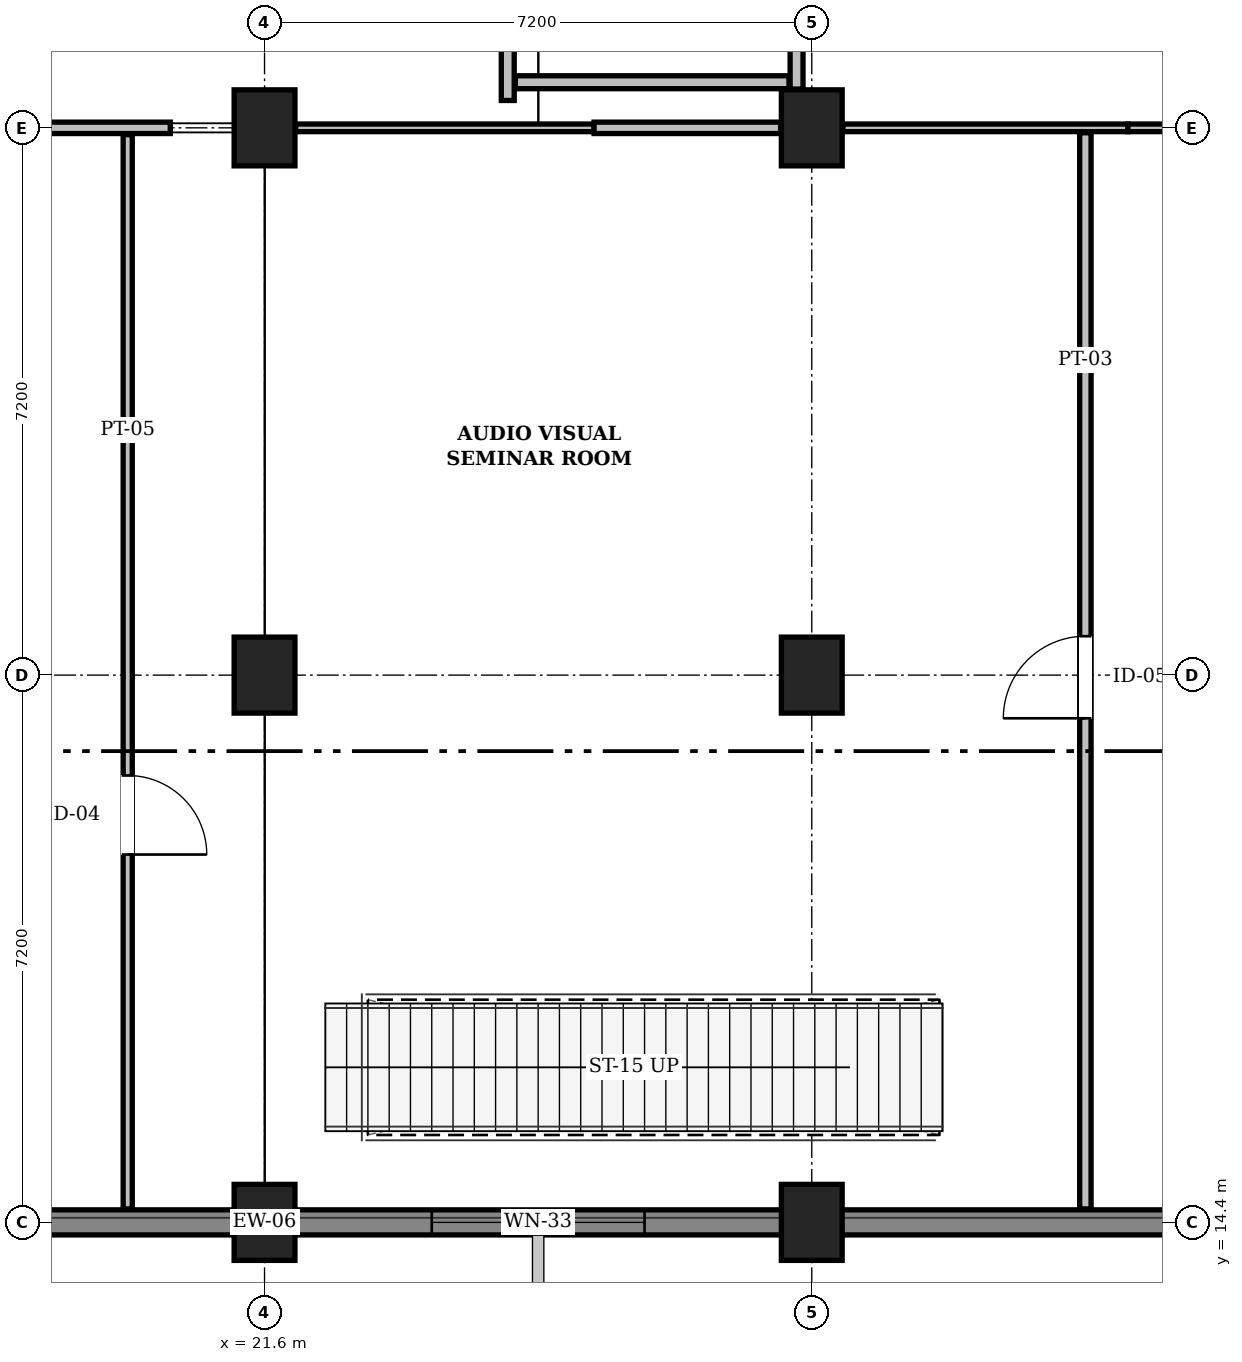
"""IFC4 building model, lengths in metres.
Left out: names, types, materials, properties, quantities, classifications, styles, units other than length and angle.
Written with IfcOpenShell. Run it as: python <this file> out.ifc"""

import sys

from ifc_helpers import new_model, si_unit, direction, frame, frame_2d, origin, origin_2d, place, context, subcontext, project, spatial, rectangle, extrude, element, fill, save


model = new_model("IFC4")
c1 = context("Model", 3, precision=1e-05, world=origin(), true_north=direction((0.0, 1.0)))
c2 = subcontext(c1, "Body", "Model", "MODEL_VIEW")
j1 = project(units=[si_unit("LENGTHUNIT", "METRE"), si_unit("PLANEANGLEUNIT", "RADIAN")], contexts=[c1])
p1 = place(None, origin())
s1 = spatial("IfcSite", under=j1, at=p1, CompositionType="ELEMENT")
p2 = place(p1, origin())
s2 = spatial("IfcBuilding", under=s1, at=p2, CompositionType="ELEMENT")
p3 = place(p2, frame((0.0, 0.0, 4.8)))
s3 = spatial("IfcBuildingStorey", under=s2, at=p3, CompositionType="ELEMENT", Elevation=4.8)
for number, where, z_axis, x_axis in (
    (1, (21.6, 14.4, 0.0), (0.0, 0.0, 1.0), (1.0, 0.0, 0.0)),
    (2, (21.6, 21.6, 0.0), (0.0, 0.0, 1.0), (1.0, 0.0, 0.0)),
    (3, (21.6, 28.8, 0.0), (0.0, 0.0, 1.0), (1.0, 0.0, 0.0)),
    (4, (28.8, 14.4, 0.0), (0.0, 0.0, 1.0), (1.0, 0.0, 0.0)),
    (5, (28.8, 21.6, 0.0), (0.0, 0.0, 1.0), (1.0, 0.0, 0.0)),
    (6, (28.8, 28.8, 0.0), (0.0, 0.0, 1.0), (1.0, 0.0, 0.0)),
):
    element("IfcColumn", number, at=place(p3, frame(where, z_axis=z_axis, x_axis=x_axis)), inside=s3, PredefinedType="COLUMN", context=c2, shape_type="SweptSolid", body=[
        extrude(rectangle(XDim=0.8, YDim=1.0, at=origin_2d()), origin(), (0.0, 0.0, 1.0), 4.8),
    ])
p4 = place(p3, frame((36.0, 14.4, 0.0), z_axis=(0.0, 0.0, 1.0), x_axis=(-1.0, 0.0, 0.0)))
e7 = element("IfcWall", 7, at=p4, inside=s3, PredefinedType="SOLIDWALL", context=c2, shape_type="SweptSolid", body=[
    extrude(rectangle(XDim=7.2, YDim=0.33, at=frame_2d((3.6, 0.0))), origin(), (0.0, 0.0, 1.0), 4.52),
])
p5 = place(p3, frame((28.8, 14.4, 0.0), z_axis=(0.0, 0.0, 1.0), x_axis=(-1.0, 0.0, 0.0)))
e8 = element("IfcWall", 8, at=p5, inside=s3, PredefinedType="SOLIDWALL", context=c2, shape_type="SweptSolid", body=[
    extrude(rectangle(XDim=7.2, YDim=0.33, at=frame_2d((3.6, 0.0))), origin(), (0.0, 0.0, 1.0), 4.52),
])
p6 = place(p5, frame((2.2, 0.0, 0.95)))
e9 = element("IfcOpeningElement", 9, at=p6, cuts=e8, PredefinedType="OPENING", context=c2, shape_type="SweptSolid", body=[
    extrude(rectangle(XDim=2.8, YDim=1.8, at=frame_2d((1.4, 0.9))), frame((0.0, 0.177, 0.0), z_axis=(0.0, -1.0, 0.0), x_axis=(1.0, 0.0, 0.0)), (0.0, 0.0, 1.0), 0.354),
])
p7 = place(p3, frame((21.6, 14.4, 0.0), z_axis=(0.0, 0.0, 1.0), x_axis=(-1.0, 0.0, 0.0)))
e10 = element("IfcWall", 10, at=p7, inside=s3, PredefinedType="SOLIDWALL", context=c2, shape_type="SweptSolid", body=[
    extrude(rectangle(XDim=7.2, YDim=0.33, at=frame_2d((3.6, 0.0))), origin(), (0.0, 0.0, 1.0), 4.52),
])
p8 = place(p3, frame((24.8, 29.16, 0.0), z_axis=(0.0, 0.0, 1.0), x_axis=(0.0, 1.0, 0.0)))
e11 = element("IfcWall", 11, at=p8, inside=s3, PredefinedType="PARTITIONING", context=c2, shape_type="SweptSolid", body=[
    extrude(rectangle(XDim=11.622, YDim=0.17, at=frame_2d((5.811, 0.0))), origin(), (0.0, 0.0, 1.0), 4.46),
])
p9 = place(p8, frame((5.201, 0.0, 0.0)))
e12 = element("IfcOpeningElement", 12, at=p9, cuts=e11, PredefinedType="OPENING", context=c2, shape_type="SweptSolid", body=[
    extrude(rectangle(XDim=1.22, YDim=2.22, at=frame_2d((0.61, 1.11))), frame((0.0, 0.097, 0.0), z_axis=(0.0, -1.0, 0.0), x_axis=(1.0, 0.0, 0.0)), (0.0, 0.0, 1.0), 0.194),
])
p10 = place(p8, frame((8.771, 0.0, 1.05)))
e13 = element("IfcOpeningElement", 13, at=p10, cuts=e11, PredefinedType="OPENING", context=c2, shape_type="SweptSolid", body=[
    extrude(rectangle(XDim=2.4, YDim=1.15, at=frame_2d((1.2, 0.575))), frame((0.0, 0.097, 0.0), z_axis=(0.0, -1.0, 0.0), x_axis=(1.0, 0.0, 0.0)), (0.0, 0.0, 1.0), 0.194),
])
p11 = place(p3, frame((28.6, 29.31, 0.0), z_axis=(0.0, 0.0, 1.0), x_axis=(0.0, 1.0, 0.0)))
e14 = element("IfcWall", 14, at=p11, inside=s3, PredefinedType="PARTITIONING", context=c2, shape_type="SweptSolid", body=[
    extrude(rectangle(XDim=3.721, YDim=0.17, at=frame_2d((1.861, 0.0))), origin(), (0.0, 0.0, 1.0), 4.08),
])
p12 = place(p3, frame((24.9, 29.4, 0.0), z_axis=(0.0, 0.0, 1.0), x_axis=(1.0, 0.0, 0.0)))
e15 = element("IfcWall", 15, at=p12, inside=s3, PredefinedType="PARTITIONING", context=c2, shape_type="SweptSolid", body=[
    extrude(rectangle(XDim=3.6, YDim=0.17, at=frame_2d((1.8, 0.0))), origin(), (0.0, 0.0, 1.0), 4.46),
])
p13 = place(p3, frame((14.81, 28.8, 0.0), z_axis=(0.0, 0.0, 1.0), x_axis=(1.0, 0.0, 0.0)))
e16 = element("IfcWall", 16, at=p13, inside=s3, PredefinedType="PARTITIONING", context=c2, shape_type="SweptSolid", body=[
    extrude(rectangle(XDim=5.55, YDim=0.15, at=frame_2d((2.775, 0.0))), origin(), (0.0, 0.0, 1.0), 3.9),
])
p14 = place(p3, frame((22.01, 28.8, 0.0), z_axis=(0.0, 0.0, 1.0), x_axis=(1.0, 0.0, 0.0)))
e17 = element("IfcWall", 17, at=p14, inside=s3, PredefinedType="PARTITIONING", context=c2, shape_type="SweptSolid", body=[
    extrude(rectangle(XDim=3.926, YDim=0.1, at=frame_2d((1.963, 0.0))), origin(), (0.0, 0.0, 1.0), 3.9),
])
p15 = place(p3, frame((29.21, 28.8, 0.0), z_axis=(0.0, 0.0, 1.0), x_axis=(1.0, 0.0, 0.0)))
e18 = element("IfcWall", 18, at=p15, inside=s3, PredefinedType="PARTITIONING", context=c2, shape_type="SweptSolid", body=[
    extrude(rectangle(XDim=3.75, YDim=0.1, at=frame_2d((1.875, 0.0))), origin(), (0.0, 0.0, 1.0), 3.9),
])
p16 = place(p3, frame((25.936, 28.8, 0.0), z_axis=(0.0, 0.0, 1.0), x_axis=(1.0, 0.0, 0.0)))
e19 = element("IfcWall", 19, at=p16, inside=s3, PredefinedType="PARTITIONING", context=c2, shape_type="SweptSolid", body=[
    extrude(rectangle(XDim=2.454, YDim=0.15, at=frame_2d((1.227, 0.0))), origin(), (0.0, 0.0, 1.0), 3.9),
])
p17 = place(p3, frame((32.96, 28.8, 0.0), z_axis=(0.0, 0.0, 1.0), x_axis=(1.0, 0.0, 0.0)))
e20 = element("IfcWall", 20, at=p17, inside=s3, PredefinedType="PARTITIONING", context=c2, shape_type="SweptSolid", body=[
    extrude(rectangle(XDim=2.63, YDim=0.1, at=frame_2d((1.315, 0.0))), origin(), (0.0, 0.0, 1.0), 3.9),
])
p18 = place(p3, frame((19.8, 14.577, 0.0), z_axis=(0.0, 0.0, 1.0), x_axis=(0.0, 1.0, 0.0)))
e21 = element("IfcWall", 21, at=p18, inside=s3, PredefinedType="PARTITIONING", context=c2, shape_type="SweptSolid", body=[
    extrude(rectangle(XDim=14.133, YDim=0.12, at=frame_2d((7.066, 0.0))), origin(), (0.0, 0.0, 1.0), 4.46),
])
p19 = place(p18, frame((4.663, 0.0, 0.0)))
e22 = element("IfcOpeningElement", 22, at=p19, cuts=e21, PredefinedType="OPENING", context=c2, shape_type="SweptSolid", body=[
    extrude(rectangle(XDim=1.04, YDim=2.18, at=frame_2d((0.52, 1.09))), frame((0.0, 0.072, 0.0), z_axis=(0.0, -1.0, 0.0), x_axis=(1.0, 0.0, 0.0)), (0.0, 0.0, 1.0), 0.144),
])
p20 = place(p3, frame((32.4, 14.577, 0.0), z_axis=(0.0, 0.0, 1.0), x_axis=(0.0, 1.0, 0.0)))
e23 = element("IfcWall", 23, at=p20, inside=s3, PredefinedType="PARTITIONING", context=c2, shape_type="SweptSolid", body=[
    extrude(rectangle(XDim=14.158, YDim=0.15, at=frame_2d((7.079, 0.0))), origin(), (0.0, 0.0, 1.0), 4.46),
])
p21 = place(p20, frame((6.455, 0.0, 0.0)))
e24 = element("IfcOpeningElement", 24, at=p21, cuts=e23, PredefinedType="OPENING", context=c2, shape_type="SweptSolid", body=[
    extrude(rectangle(XDim=1.08, YDim=2.2, at=frame_2d((0.54, 1.1))), frame((0.0, 0.087, 0.0), z_axis=(0.0, -1.0, 0.0), x_axis=(1.0, 0.0, 0.0)), (0.0, 0.0, 1.0), 0.174),
])
p22 = place(p6, origin())
e25 = element("IfcWindow", 25, at=p22, inside=s3, PartitioningType="SINGLE_PANEL", PredefinedType="WINDOW", context=c2, shape_type="SweptSolid", body=[
    extrude(rectangle(XDim=2.8, YDim=1.8, at=frame_2d((1.4, 0.9))), frame((0.0, 0.03, 0.0), z_axis=(0.0, -1.0, 0.0), x_axis=(1.0, 0.0, 0.0)), (0.0, 0.0, 1.0), 0.06),
])
fill(e9, e25)
p23 = place(p19, frame((1.04, 0.0, 0.0), z_axis=(0.0, 0.0, 1.0), x_axis=(-1.0, 0.0, 0.0)))
e26 = element("IfcDoor", 26, at=p23, inside=s3, OperationType="SINGLE_SWING_RIGHT", PredefinedType="DOOR", context=c2, shape_type="SweptSolid", body=[
    extrude(rectangle(XDim=1.04, YDim=2.18, at=frame_2d((0.52, 1.09))), frame((0.0, 0.025, 0.0), z_axis=(0.0, -1.0, 0.0), x_axis=(1.0, 0.0, 0.0)), (0.0, 0.0, 1.0), 0.05),
])
fill(e22, e26)
p24 = place(p21, origin())
e27 = element("IfcDoor", 27, at=p24, inside=s3, OperationType="SINGLE_SWING_LEFT", PredefinedType="DOOR", context=c2, shape_type="SweptSolid", body=[
    extrude(rectangle(XDim=1.08, YDim=2.2, at=frame_2d((0.54, 1.1))), frame((0.0, 0.025, 0.0), z_axis=(0.0, -1.0, 0.0), x_axis=(1.0, 0.0, 0.0)), (0.0, 0.0, 1.0), 0.05),
])
fill(e24, e27)
save(model, sys.argv[1])
